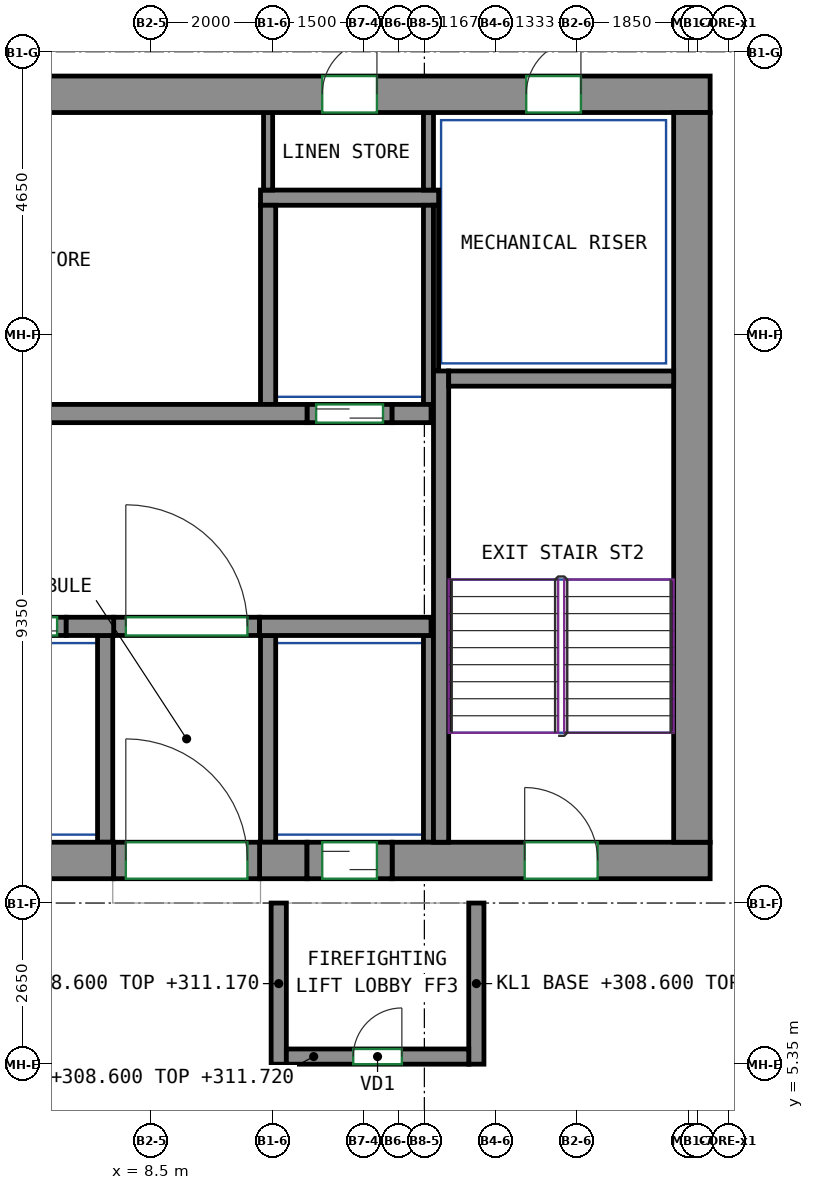
"""IFC4 building model, lengths in metres.
Left out: names, types, materials, properties, quantities, classifications, styles, units other than length and angle.
Written with IfcOpenShell. Run it as: python <this file> out.ifc"""

import sys

from ifc_helpers import new_model, si_unit, direction, frame, frame_2d, origin, place, context, subcontext, project, spatial, rectangle, extrude, source, transform, mapped, element, fill, save


model = new_model("IFC4")
c1 = context("Model", 3, precision=1e-05, world=origin(), true_north=direction((0.0, 1.0)))
c2 = subcontext(c1, "Body", "Model", "MODEL_VIEW")
j1 = project(units=[si_unit("LENGTHUNIT", "METRE"), si_unit("PLANEANGLEUNIT", "RADIAN")], contexts=[c1])
p1 = place(None, origin())
s1 = spatial("IfcSite", under=j1, at=p1, CompositionType="ELEMENT")
p2 = place(p1, origin())
s2 = spatial("IfcBuilding", under=s1, at=p2, CompositionType="ELEMENT")
p3 = place(p2, frame((0.0, 0.0, 308.6)))
s3 = spatial("IfcBuildingStorey", under=s2, at=p3, CompositionType="ELEMENT", Elevation=308.6)
m1 = source(origin(), c2, "Body", "SweptSolid", [
    extrude(rectangle(XDim=14.18, YDim=0.6, at=frame_2d((7.09, 0.0))), origin(), (0.0, 0.0, 1.0), 3.12),
])
p4 = place(p3, frame((-6.29, 8.7, 0.0), z_axis=(0.0, 0.0, 1.0), x_axis=(1.0, 0.0, 0.0)))
e1 = element("IfcWall", 1, at=p4, inside=s3, PredefinedType="SHEAR", context=c2, shape_type="MappedRepresentation", body=[
    mapped(m1, transform((0.0, 0.0, 0.0))),
])
m2 = source(origin(), c2, "Body", "SweptSolid", [
    extrude(rectangle(XDim=0.78, YDim=0.6, at=frame_2d((0.39, 0.0))), origin(), (0.0, 0.0, 1.0), 3.12),
])
p5 = place(p3, frame((10.29, 8.7, 0.0), z_axis=(0.0, 0.0, 1.0), x_axis=(1.0, 0.0, 0.0)))
e2 = element("IfcWall", 2, at=p5, inside=s3, PredefinedType="SHEAR", context=c2, shape_type="MappedRepresentation", body=[
    mapped(m2, transform((0.0, 0.0, 0.0))),
])
m3 = source(origin(), c2, "Body", "SweptSolid", [
    extrude(rectangle(XDim=5.23, YDim=0.6, at=frame_2d((2.615, 0.0))), origin(), (0.0, 0.0, 1.0), 3.12),
])
p6 = place(p3, frame((12.47, 8.7, 0.0), z_axis=(0.0, 0.0, 1.0), x_axis=(1.0, 0.0, 0.0)))
e3 = element("IfcWall", 3, at=p6, inside=s3, PredefinedType="SHEAR", context=c2, shape_type="MappedRepresentation", body=[
    mapped(m3, transform((0.0, 0.0, 0.0))),
])
p7 = place(p6, frame((2.18, 0.0, 0.0)))
e4 = element("IfcOpeningElement", 4, at=p7, cuts=e3, PredefinedType="OPENING", context=c2, shape_type="SweptSolid", body=[
    extrude(rectangle(XDim=1.2, YDim=2.1, at=frame_2d((0.6, 1.05))), frame((0.0, 0.31, 0.0), z_axis=(0.0, -1.0, 0.0), x_axis=(1.0, 0.0, 0.0)), (0.0, 0.0, 1.0), 0.62),
])
m4 = source(origin(), c2, "Body", "SweptSolid", [
    extrude(rectangle(XDim=33.3, YDim=0.6, at=frame_2d((16.65, 0.0))), origin(), (0.0, 0.0, 1.0), 3.12),
])
p8 = place(p3, frame((-15.6, 21.3, 0.0), z_axis=(0.0, 0.0, 1.0), x_axis=(1.0, 0.0, 0.0)))
e5 = element("IfcWall", 5, at=p8, inside=s3, PredefinedType="SHEAR", context=c2, shape_type="MappedRepresentation", body=[
    mapped(m4, transform((0.0, 0.0, 0.0))),
])
p9 = place(p8, frame((5.708, 0.0, 0.0)))
e6 = element("IfcOpeningElement", 6, at=p9, cuts=e5, PredefinedType="OPENING", context=c2, shape_type="SweptSolid", body=[
    extrude(rectangle(XDim=0.9, YDim=2.1, at=frame_2d((0.45, 1.05))), frame((0.0, 0.31, 0.0), z_axis=(0.0, -1.0, 0.0), x_axis=(1.0, 0.0, 0.0)), (0.0, 0.0, 1.0), 0.62),
])
p10 = place(p8, frame((10.773, 0.0, 0.0)))
e7 = element("IfcOpeningElement", 7, at=p10, cuts=e5, PredefinedType="OPENING", context=c2, shape_type="SweptSolid", body=[
    extrude(rectangle(XDim=0.9, YDim=2.1, at=frame_2d((0.45, 1.05))), frame((0.0, 0.31, 0.0), z_axis=(0.0, -1.0, 0.0), x_axis=(1.0, 0.0, 0.0)), (0.0, 0.0, 1.0), 0.62),
])
p11 = place(p8, frame((15.838, 0.0, 0.0)))
e8 = element("IfcOpeningElement", 8, at=p11, cuts=e5, PredefinedType="OPENING", context=c2, shape_type="SweptSolid", body=[
    extrude(rectangle(XDim=0.9, YDim=2.1, at=frame_2d((0.45, 1.05))), frame((0.0, 0.31, 0.0), z_axis=(0.0, -1.0, 0.0), x_axis=(1.0, 0.0, 0.0)), (0.0, 0.0, 1.0), 0.62),
])
p12 = place(p8, frame((21.493, 0.0, 0.0)))
e9 = element("IfcOpeningElement", 9, at=p12, cuts=e5, PredefinedType="OPENING", context=c2, shape_type="SweptSolid", body=[
    extrude(rectangle(XDim=0.9, YDim=2.1, at=frame_2d((0.45, 1.05))), frame((0.0, 0.31, 0.0), z_axis=(0.0, -1.0, 0.0), x_axis=(1.0, 0.0, 0.0)), (0.0, 0.0, 1.0), 0.62),
])
p13 = place(p8, frame((26.92, 0.0, 0.0)))
e10 = element("IfcOpeningElement", 10, at=p13, cuts=e5, PredefinedType="OPENING", context=c2, shape_type="SweptSolid", body=[
    extrude(rectangle(XDim=0.9, YDim=2.1, at=frame_2d((0.45, 1.05))), frame((0.0, 0.31, 0.0), z_axis=(0.0, -1.0, 0.0), x_axis=(1.0, 0.0, 0.0)), (0.0, 0.0, 1.0), 0.62),
])
p14 = place(p8, frame((2.125, 0.0, 0.0)))
e11 = element("IfcOpeningElement", 11, at=p14, cuts=e5, PredefinedType="OPENING", context=c2, shape_type="SweptSolid", body=[
    extrude(rectangle(XDim=0.9, YDim=2.1, at=frame_2d((0.45, 1.05))), frame((0.0, 0.31, 0.0), z_axis=(0.0, -1.0, 0.0), x_axis=(1.0, 0.0, 0.0)), (0.0, 0.0, 1.0), 0.62),
])
p15 = place(p8, frame((30.275, 0.0, 0.0)))
e12 = element("IfcOpeningElement", 12, at=p15, cuts=e5, PredefinedType="OPENING", context=c2, shape_type="SweptSolid", body=[
    extrude(rectangle(XDim=0.9, YDim=2.1, at=frame_2d((0.45, 1.05))), frame((0.0, 0.31, 0.0), z_axis=(0.0, -1.0, 0.0), x_axis=(1.0, 0.0, 0.0)), (0.0, 0.0, 1.0), 0.62),
])
m5 = source(origin(), c2, "Body", "SweptSolid", [
    extrude(rectangle(XDim=12.0, YDim=0.6, at=frame_2d((6.0, 0.0))), origin(), (0.0, 0.0, 1.0), 3.12),
])
p16 = place(p3, frame((17.4, 9.0, 0.0), z_axis=(0.0, 0.0, 1.0), x_axis=(0.0, 1.0, 0.0)))
e13 = element("IfcWall", 13, at=p16, inside=s3, PredefinedType="SHEAR", context=c2, shape_type="MappedRepresentation", body=[
    mapped(m5, transform((0.0, 0.0, 0.0))),
])
m6 = source(origin(), c2, "Body", "SweptSolid", [
    extrude(rectangle(XDim=7.75, YDim=0.25, at=frame_2d((3.875, 0.0))), origin(), (0.0, 0.0, 1.0), 3.12),
])
p17 = place(p3, frame((13.275, 9.0, 0.0), z_axis=(0.0, 0.0, 1.0), x_axis=(0.0, 1.0, 0.0)))
e14 = element("IfcWall", 14, at=p17, inside=s3, PredefinedType="SHEAR", context=c2, shape_type="MappedRepresentation", body=[
    mapped(m6, transform((0.0, 0.0, 0.0))),
])
m7 = source(origin(), c2, "Body", "SweptSolid", [
    extrude(rectangle(XDim=3.7, YDim=0.25, at=frame_2d((1.85, 0.0))), origin(), (0.0, 0.0, 1.0), 3.12),
])
p18 = place(p3, frame((13.4, 16.625, 0.0), z_axis=(0.0, 0.0, 1.0), x_axis=(1.0, 0.0, 0.0)))
e15 = element("IfcWall", 15, at=p18, inside=s3, PredefinedType="SHEAR", context=c2, shape_type="MappedRepresentation", body=[
    mapped(m7, transform((0.0, 0.0, 0.0))),
])
m8 = source(origin(), c2, "Body", "SweptSolid", [
    extrude(rectangle(XDim=0.78, YDim=0.3, at=frame_2d((0.39, 0.0))), origin(), (0.0, 0.0, 1.0), 3.12),
])
p19 = place(p3, frame((7.11, 12.55, 0.0), z_axis=(0.0, 0.0, 1.0), x_axis=(1.0, 0.0, 0.0)))
e16 = element("IfcWall", 16, at=p19, inside=s3, PredefinedType="SHEAR", context=c2, shape_type="MappedRepresentation", body=[
    mapped(m8, transform((0.0, 0.0, 0.0))),
])
m9 = source(origin(), c2, "Body", "SweptSolid", [
    extrude(rectangle(XDim=2.82, YDim=0.3, at=frame_2d((1.41, 0.0))), origin(), (0.0, 0.0, 1.0), 3.12),
])
p20 = place(p3, frame((10.29, 12.55, 0.0), z_axis=(0.0, 0.0, 1.0), x_axis=(1.0, 0.0, 0.0)))
e17 = element("IfcWall", 17, at=p20, inside=s3, PredefinedType="SHEAR", context=c2, shape_type="MappedRepresentation", body=[
    mapped(m9, transform((0.0, 0.0, 0.0))),
])
m10 = source(origin(), c2, "Body", "SweptSolid", [
    extrude(rectangle(XDim=22.08, YDim=0.3, at=frame_2d((11.04, 0.0))), origin(), (0.0, 0.0, 1.0), 3.12),
])
p21 = place(p3, frame((-11.01, 16.05, 0.0), z_axis=(0.0, 0.0, 1.0), x_axis=(1.0, 0.0, 0.0)))
e18 = element("IfcWall", 18, at=p21, inside=s3, PredefinedType="SHEAR", context=c2, shape_type="MappedRepresentation", body=[
    mapped(m10, transform((0.0, 0.0, 0.0))),
])
m11 = source(origin(), c2, "Body", "SweptSolid", [
    extrude(rectangle(XDim=0.64, YDim=0.3, at=frame_2d((0.32, 0.0))), origin(), (0.0, 0.0, 1.0), 3.12),
])
p22 = place(p3, frame((12.47, 16.05, 0.0), z_axis=(0.0, 0.0, 1.0), x_axis=(1.0, 0.0, 0.0)))
e19 = element("IfcWall", 19, at=p22, inside=s3, PredefinedType="SHEAR", context=c2, shape_type="MappedRepresentation", body=[
    mapped(m11, transform((0.0, 0.0, 0.0))),
])
m12 = source(origin(), c2, "Body", "SweptSolid", [
    extrude(rectangle(XDim=1.4, YDim=0.3, at=frame_2d((0.7, 0.0))), origin(), (0.0, 0.0, 1.0), 3.12),
])
p23 = place(p3, frame((5.71, 12.55, 0.0), z_axis=(0.0, 0.0, 1.0), x_axis=(1.0, 0.0, 0.0)))
e20 = element("IfcWall", 20, at=p23, inside=s3, PredefinedType="PARTITIONING", context=c2, shape_type="MappedRepresentation", body=[
    mapped(m12, transform((0.0, 0.0, 0.0))),
])
p24 = place(p23, frame((0.15, 0.0, 0.0)))
e21 = element("IfcOpeningElement", 21, at=p24, cuts=e20, PredefinedType="OPENING", context=c2, shape_type="SweptSolid", body=[
    extrude(rectangle(XDim=1.1, YDim=2.1, at=frame_2d((0.55, 1.05))), frame((0.0, 0.16, 0.0), z_axis=(0.0, -1.0, 0.0), x_axis=(1.0, 0.0, 0.0)), (0.0, 0.0, 1.0), 0.32),
])
m13 = source(origin(), c2, "Body", "SweptSolid", [
    extrude(rectangle(XDim=1.4, YDim=0.3, at=frame_2d((0.7, 0.0))), origin(), (0.0, 0.0, 1.0), 3.12),
])
p25 = place(p3, frame((11.07, 16.05, 0.0), z_axis=(0.0, 0.0, 1.0), x_axis=(1.0, 0.0, 0.0)))
e22 = element("IfcWall", 22, at=p25, inside=s3, PredefinedType="PARTITIONING", context=c2, shape_type="MappedRepresentation", body=[
    mapped(m13, transform((0.0, 0.0, 0.0))),
])
p26 = place(p25, frame((0.15, 0.0, 0.0)))
e23 = element("IfcOpeningElement", 23, at=p26, cuts=e22, PredefinedType="OPENING", context=c2, shape_type="SweptSolid", body=[
    extrude(rectangle(XDim=1.1, YDim=2.1, at=frame_2d((0.55, 1.05))), frame((0.0, 0.16, 0.0), z_axis=(0.0, -1.0, 0.0), x_axis=(1.0, 0.0, 0.0)), (0.0, 0.0, 1.0), 0.32),
])
m14 = source(origin(), c2, "Body", "SweptSolid", [
    extrude(rectangle(XDim=2.4, YDim=0.3, at=frame_2d((1.2, 0.0))), origin(), (0.0, 0.0, 1.0), 3.12),
])
p27 = place(p3, frame((7.89, 12.55, 0.0), z_axis=(0.0, 0.0, 1.0), x_axis=(1.0, 0.0, 0.0)))
e24 = element("IfcWall", 24, at=p27, inside=s3, PredefinedType="PARTITIONING", context=c2, shape_type="MappedRepresentation", body=[
    mapped(m14, transform((0.0, 0.0, 0.0))),
])
p28 = place(p27, frame((0.2, 0.0, 0.0)))
e25 = element("IfcOpeningElement", 25, at=p28, cuts=e24, PredefinedType="OPENING", context=c2, shape_type="SweptSolid", body=[
    extrude(rectangle(XDim=2.0, YDim=2.1, at=frame_2d((1.0, 1.05))), frame((0.0, 0.16, 0.0), z_axis=(0.0, -1.0, 0.0), x_axis=(1.0, 0.0, 0.0)), (0.0, 0.0, 1.0), 0.32),
])
m15 = source(origin(), c2, "Body", "SweptSolid", [
    extrude(rectangle(XDim=2.65, YDim=0.25, at=frame_2d((1.325, 0.0))), origin(), (0.0, 0.0, 1.0), 2.57),
])
for number, where, z_axis, x_axis in (
    (26, (10.605, 5.35, 0.0), (0.0, 0.0, 1.0), (0.0, 1.0, 0.0)),
    (27, (13.855, 5.35, 0.0), (0.0, 0.0, 1.0), (0.0, 1.0, 0.0)),
):
    element("IfcWall", number, at=place(p3, frame(where, z_axis=z_axis, x_axis=x_axis)), inside=s3, PredefinedType="PARTITIONING", context=c2, shape_type="MappedRepresentation", body=[
        mapped(m15, transform((0.0, 0.0, 0.0))),
    ])
m16 = source(origin(), c2, "Body", "SweptSolid", [
    extrude(rectangle(XDim=3.0, YDim=0.25, at=frame_2d((1.5, 0.0))), origin(), (0.0, 0.0, 1.0), 3.12),
])
p29 = place(p3, frame((10.73, 5.475, 0.0), z_axis=(0.0, 0.0, 1.0), x_axis=(1.0, 0.0, 0.0)))
e28 = element("IfcWall", 28, at=p29, inside=s3, PredefinedType="PARTITIONING", context=c2, shape_type="MappedRepresentation", body=[
    mapped(m16, transform((0.0, 0.0, 0.0))),
])
p30 = place(p29, frame((1.1, 0.0, 0.0)))
e29 = element("IfcOpeningElement", 29, at=p30, cuts=e28, PredefinedType="OPENING", context=c2, shape_type="SweptSolid", body=[
    extrude(rectangle(XDim=0.8, YDim=2.0, at=frame_2d((0.4, 1.0))), frame((0.0, 0.135, 0.0), z_axis=(0.0, -1.0, 0.0), x_axis=(1.0, 0.0, 0.0)), (0.0, 0.0, 1.0), 0.27),
])
m17 = source(origin(), c2, "Body", "SweptSolid", [
    extrude(rectangle(XDim=2.93, YDim=0.25, at=frame_2d((1.465, 0.0))), origin(), (0.0, 0.0, 1.0), 3.12),
])
p31 = place(p3, frame((10.305, 19.6, 0.0), z_axis=(0.0, 0.0, 1.0), x_axis=(1.0, 0.0, 0.0)))
e30 = element("IfcWall", 30, at=p31, inside=s3, PredefinedType="PARTITIONING", context=c2, shape_type="MappedRepresentation", body=[
    mapped(m17, transform((0.0, 0.0, 0.0))),
])
m18 = source(origin(), c2, "Body", "SweptSolid", [
    extrude(rectangle(XDim=3.275, YDim=0.165, at=frame_2d((1.638, 0.0))), origin(), (0.0, 0.0, 1.0), 3.12),
])
p32 = place(p3, frame((13.067, 16.2, 0.0), z_axis=(0.0, 0.0, 1.0), x_axis=(0.0, 1.0, 0.0)))
e31 = element("IfcWall", 31, at=p32, inside=s3, PredefinedType="PARTITIONING", context=c2, shape_type="MappedRepresentation", body=[
    mapped(m18, transform((0.0, 0.0, 0.0))),
])
m19 = source(origin(), c2, "Body", "SweptSolid", [
    extrude(rectangle(XDim=1.275, YDim=0.165, at=frame_2d((0.637, 0.0))), origin(), (0.0, 0.0, 1.0), 3.12),
])
p33 = place(p3, frame((13.067, 19.725, 0.0), z_axis=(0.0, 0.0, 1.0), x_axis=(0.0, 1.0, 0.0)))
e32 = element("IfcWall", 32, at=p33, inside=s3, PredefinedType="PARTITIONING", context=c2, shape_type="MappedRepresentation", body=[
    mapped(m19, transform((0.0, 0.0, 0.0))),
])
m20 = source(origin(), c2, "Body", "SweptSolid", [
    extrude(rectangle(XDim=3.275, YDim=0.25, at=frame_2d((1.638, 0.0))), origin(), (0.0, 0.0, 1.0), 3.12),
])
p34 = place(p3, frame((10.43, 16.2, 0.0), z_axis=(0.0, 0.0, 1.0), x_axis=(0.0, 1.0, 0.0)))
e33 = element("IfcWall", 33, at=p34, inside=s3, PredefinedType="PARTITIONING", context=c2, shape_type="MappedRepresentation", body=[
    mapped(m20, transform((0.0, 0.0, 0.0))),
])
m21 = source(origin(), c2, "Body", "SweptSolid", [
    extrude(rectangle(XDim=2.725, YDim=0.085, at=frame_2d((1.363, 0.0))), origin(), (0.0, 0.0, 1.0), 3.12),
])
p35 = place(p3, frame((13.192, 16.75, 0.0), z_axis=(0.0, 0.0, 1.0), x_axis=(0.0, 1.0, 0.0)))
e34 = element("IfcWall", 34, at=p35, inside=s3, PredefinedType="PARTITIONING", context=c2, shape_type="MappedRepresentation", body=[
    mapped(m21, transform((0.0, 0.0, 0.0))),
])
m22 = source(origin(), c2, "Body", "SweptSolid", [
    extrude(rectangle(XDim=3.4, YDim=0.25, at=frame_2d((1.7, 0.0))), origin(), (0.0, 0.0, 1.0), 3.12),
])
p36 = place(p3, frame((10.43, 9.0, 0.0), z_axis=(0.0, 0.0, 1.0), x_axis=(0.0, 1.0, 0.0)))
e35 = element("IfcWall", 35, at=p36, inside=s3, PredefinedType="PARTITIONING", context=c2, shape_type="MappedRepresentation", body=[
    mapped(m22, transform((0.0, 0.0, 0.0))),
])
m23 = source(origin(), c2, "Body", "SweptSolid", [
    extrude(rectangle(XDim=3.4, YDim=0.165, at=frame_2d((1.7, 0.0))), origin(), (0.0, 0.0, 1.0), 3.12),
])
p37 = place(p3, frame((13.067, 9.0, 0.0), z_axis=(0.0, 0.0, 1.0), x_axis=(0.0, 1.0, 0.0)))
e36 = element("IfcWall", 36, at=p37, inside=s3, PredefinedType="PARTITIONING", context=c2, shape_type="MappedRepresentation", body=[
    mapped(m23, transform((0.0, 0.0, 0.0))),
])
p38 = place(p3, frame((7.75, 9.0, 0.0), z_axis=(0.0, 0.0, 1.0), x_axis=(0.0, 1.0, 0.0)))
e37 = element("IfcWall", 37, at=p38, inside=s3, PredefinedType="PARTITIONING", context=c2, shape_type="MappedRepresentation", body=[
    mapped(m22, transform((0.0, 0.0, 0.0))),
])
m24 = source(origin(), c2, "Body", "SweptSolid", [
    extrude(rectangle(XDim=1.275, YDim=0.15, at=frame_2d((0.637, 0.0))), origin(), (0.0, 0.0, 1.0), 3.12),
])
p39 = place(p3, frame((10.43, 19.725, 0.0), z_axis=(0.0, 0.0, 1.0), x_axis=(0.0, 1.0, 0.0)))
e38 = element("IfcWall", 38, at=p39, inside=s3, PredefinedType="PARTITIONING", context=c2, shape_type="MappedRepresentation", body=[
    mapped(m24, transform((0.0, 0.0, 0.0))),
])
m25 = source(origin(), c2, "Body", "SweptSolid", [
    extrude(rectangle(XDim=2.4, YDim=0.6, at=frame_2d((1.2, 0.0))), origin(), (0.0, 0.0, 1.0), 2.7),
])
p40 = place(p3, frame((7.89, 8.7, 0.0), z_axis=(0.0, 0.0, 1.0), x_axis=(1.0, 0.0, 0.0)))
e39 = element("IfcWall", 39, at=p40, inside=s3, PredefinedType="PARTITIONING", context=c2, shape_type="MappedRepresentation", body=[
    mapped(m25, transform((0.0, 0.0, 0.0))),
])
p41 = place(p40, frame((0.2, 0.0, 0.0)))
e40 = element("IfcOpeningElement", 40, at=p41, cuts=e39, PredefinedType="OPENING", context=c2, shape_type="SweptSolid", body=[
    extrude(rectangle(XDim=2.0, YDim=2.1, at=frame_2d((1.0, 1.05))), frame((0.0, 0.31, 0.0), z_axis=(0.0, -1.0, 0.0), x_axis=(1.0, 0.0, 0.0)), (0.0, 0.0, 1.0), 0.62),
])
m26 = source(origin(), c2, "Body", "SweptSolid", [
    extrude(rectangle(XDim=1.4, YDim=0.6, at=frame_2d((0.7, 0.0))), origin(), (0.0, 0.0, 1.0), 2.7),
])
p42 = place(p3, frame((11.07, 8.7, 0.0), z_axis=(0.0, 0.0, 1.0), x_axis=(1.0, 0.0, 0.0)))
e41 = element("IfcWall", 41, at=p42, inside=s3, PredefinedType="PARTITIONING", context=c2, shape_type="MappedRepresentation", body=[
    mapped(m26, transform((0.0, 0.0, 0.0))),
])
p43 = place(p42, frame((0.25, 0.0, 0.0)))
e42 = element("IfcOpeningElement", 42, at=p43, cuts=e41, PredefinedType="OPENING", context=c2, shape_type="SweptSolid", body=[
    extrude(rectangle(XDim=0.9, YDim=2.1, at=frame_2d((0.45, 1.05))), frame((0.0, 0.31, 0.0), z_axis=(0.0, -1.0, 0.0), x_axis=(1.0, 0.0, 0.0)), (0.0, 0.0, 1.0), 0.62),
])
p44 = place(p28, origin())
e43 = element("IfcDoor", 43, at=p44, inside=s3, OperationType="DOUBLE_DOOR_SINGLE_SWING", PredefinedType="DOOR", context=c2, shape_type="SweptSolid", body=[
    extrude(rectangle(XDim=2.0, YDim=2.1, at=frame_2d((1.0, 1.05))), frame((0.0, 0.025, 0.0), z_axis=(0.0, -1.0, 0.0), x_axis=(1.0, 0.0, 0.0)), (0.0, 0.0, 1.0), 0.05),
])
fill(e25, e43)
p45 = place(p41, origin())
e44 = element("IfcDoor", 44, at=p45, inside=s3, OperationType="DOUBLE_DOOR_SINGLE_SWING", PredefinedType="DOOR", context=c2, shape_type="SweptSolid", body=[
    extrude(rectangle(XDim=2.0, YDim=2.1, at=frame_2d((1.0, 1.05))), frame((0.0, 0.205, 0.0), z_axis=(0.0, -1.0, 0.0), x_axis=(1.0, 0.0, 0.0)), (0.0, 0.0, 1.0), 0.05),
])
fill(e40, e44)
p46 = place(p30, origin())
e45 = element("IfcDoor", 45, at=p46, inside=s3, OperationType="SINGLE_SWING_RIGHT", PredefinedType="DOOR", context=c2, shape_type="SweptSolid", body=[
    extrude(rectangle(XDim=0.8, YDim=2.0, at=frame_2d((0.4, 1.0))), frame((0.0, 0.025, 0.0), z_axis=(0.0, -1.0, 0.0), x_axis=(1.0, 0.0, 0.0)), (0.0, 0.0, 1.0), 0.05),
])
fill(e29, e45)
p47 = place(p43, origin())
e46 = element("IfcDoor", 46, at=p47, inside=s3, OperationType="SLIDING_TO_LEFT", PredefinedType="DOOR", context=c2, shape_type="SweptSolid", body=[
    extrude(rectangle(XDim=0.9, YDim=2.1, at=frame_2d((0.45, 1.05))), frame((0.0, 0.205, 0.0), z_axis=(0.0, -1.0, 0.0), x_axis=(1.0, 0.0, 0.0)), (0.0, 0.0, 1.0), 0.05),
])
fill(e42, e46)
p48 = place(p24, origin())
e47 = element("IfcDoor", 47, at=p48, inside=s3, OperationType="DOUBLE_DOOR_SLIDING", PredefinedType="DOOR", context=c2, shape_type="SweptSolid", body=[
    extrude(rectangle(XDim=1.1, YDim=2.1, at=frame_2d((0.55, 1.05))), frame((0.0, 0.025, 0.0), z_axis=(0.0, -1.0, 0.0), x_axis=(1.0, 0.0, 0.0)), (0.0, 0.0, 1.0), 0.05),
])
fill(e21, e47)
p49 = place(p26, origin())
e48 = element("IfcDoor", 48, at=p49, inside=s3, OperationType="DOUBLE_DOOR_SLIDING", PredefinedType="DOOR", context=c2, shape_type="SweptSolid", body=[
    extrude(rectangle(XDim=1.1, YDim=2.1, at=frame_2d((0.55, 1.05))), frame((0.0, 0.025, 0.0), z_axis=(0.0, -1.0, 0.0), x_axis=(1.0, 0.0, 0.0)), (0.0, 0.0, 1.0), 0.05),
])
fill(e23, e48)
p50 = place(p13, origin())
e49 = element("IfcDoor", 49, at=p50, inside=s3, OperationType="SINGLE_SWING_RIGHT", PredefinedType="DOOR", context=c2, shape_type="SweptSolid", body=[
    extrude(rectangle(XDim=0.9, YDim=2.1, at=frame_2d((0.45, 1.05))), frame((0.0, -0.155, 0.0), z_axis=(0.0, -1.0, 0.0), x_axis=(1.0, 0.0, 0.0)), (0.0, 0.0, 1.0), 0.05),
])
fill(e10, e49)
p51 = place(p15, origin())
e50 = element("IfcDoor", 50, at=p51, inside=s3, OperationType="SINGLE_SWING_RIGHT", PredefinedType="DOOR", context=c2, shape_type="SweptSolid", body=[
    extrude(rectangle(XDim=0.9, YDim=2.1, at=frame_2d((0.45, 1.05))), frame((0.0, -0.155, 0.0), z_axis=(0.0, -1.0, 0.0), x_axis=(1.0, 0.0, 0.0)), (0.0, 0.0, 1.0), 0.05),
])
fill(e12, e50)
p52 = place(p7, origin())
e51 = element("IfcDoor", 51, at=p52, inside=s3, OperationType="DOUBLE_DOOR_SINGLE_SWING", PredefinedType="DOOR", context=c2, shape_type="SweptSolid", body=[
    extrude(rectangle(XDim=1.2, YDim=2.1, at=frame_2d((0.6, 1.05))), frame((0.0, 0.205, 0.0), z_axis=(0.0, -1.0, 0.0), x_axis=(1.0, 0.0, 0.0)), (0.0, 0.0, 1.0), 0.05),
])
fill(e4, e51)
save(model, sys.argv[1])
